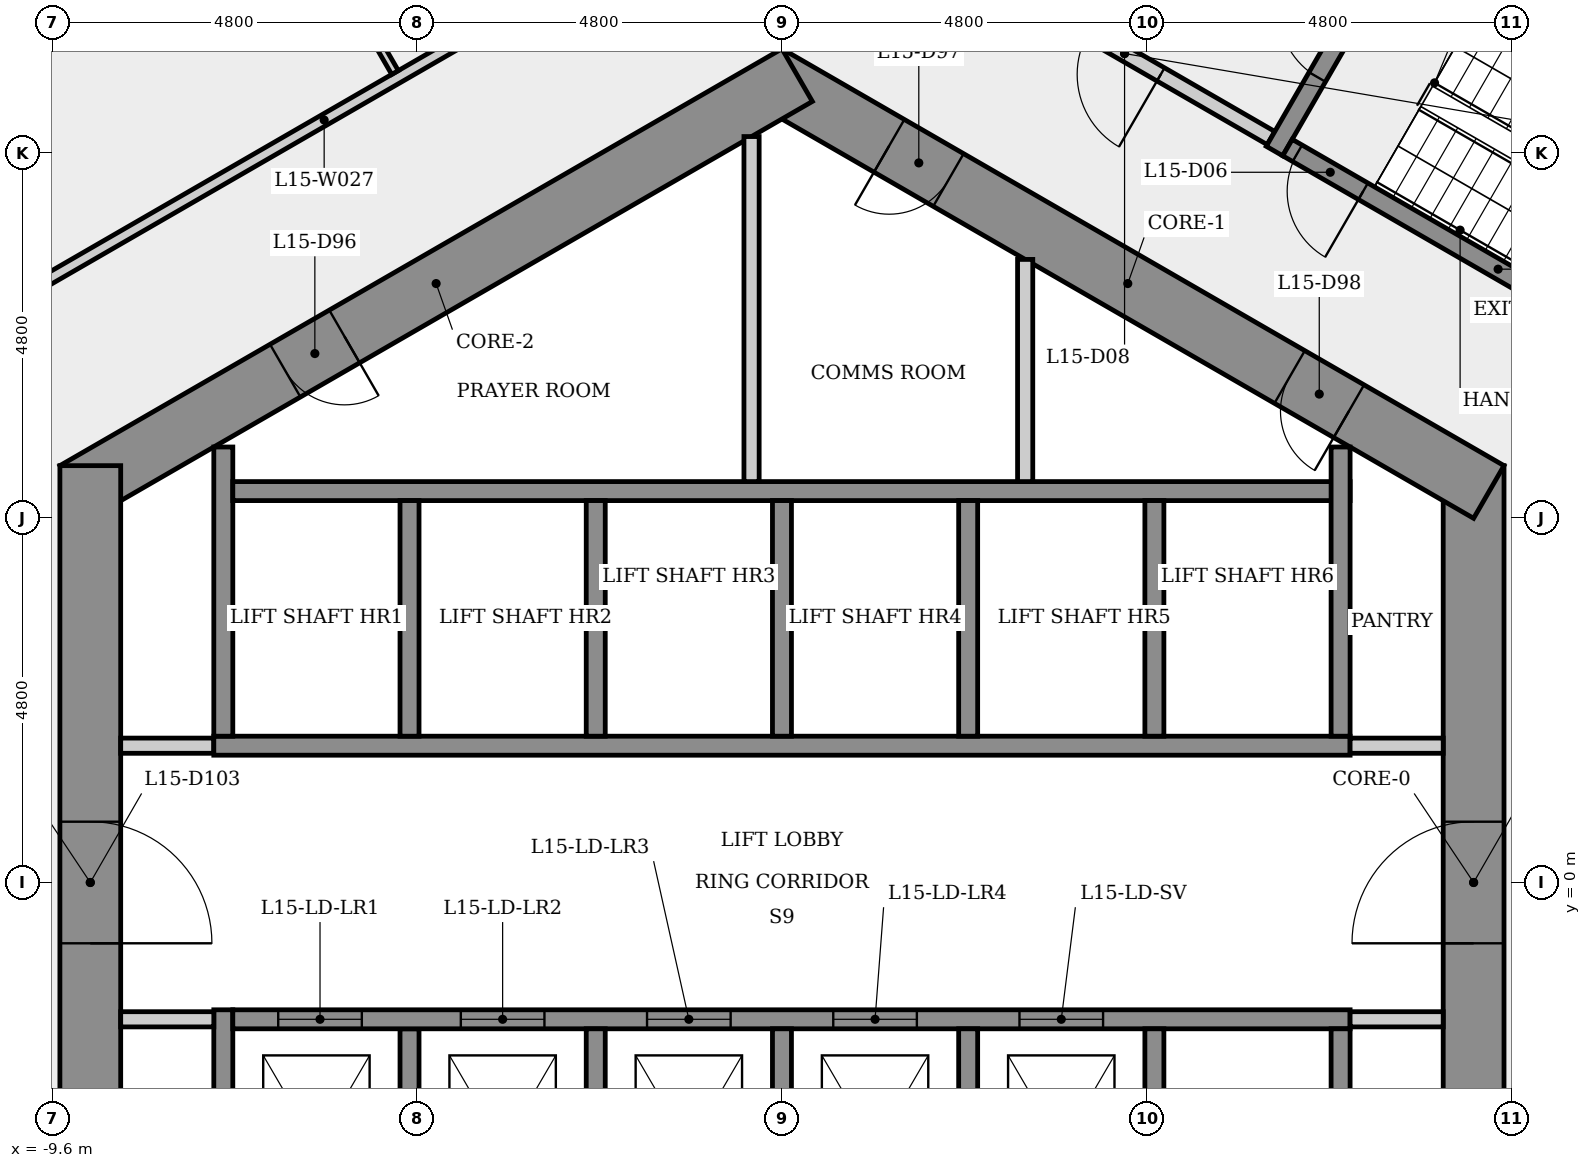
"""IFC4 building model, lengths in metres.
Left out: names, types, materials, properties, quantities, classifications, styles, units other than length and angle.
Written with IfcOpenShell. Run it as: python <this file> out.ifc"""

import sys

from ifc_helpers import new_model, si_unit, direction, frame, frame_2d, origin, place, context, subcontext, project, spatial, rectangle, extrude, element, fill, save


model = new_model("IFC4")
c1 = context("Model", 3, precision=1e-05, world=origin(), true_north=direction((0.0, 1.0)))
c2 = subcontext(c1, "Body", "Model", "MODEL_VIEW")
j1 = project(units=[si_unit("LENGTHUNIT", "METRE"), si_unit("PLANEANGLEUNIT", "RADIAN")], contexts=[c1])
p1 = place(None, origin())
s1 = spatial("IfcSite", under=j1, at=p1, CompositionType="ELEMENT")
p2 = place(p1, origin())
s2 = spatial("IfcBuilding", under=s1, at=p2, CompositionType="ELEMENT")
p3 = place(p2, frame((0.0, 0.0, 59.5)))
s3 = spatial("IfcBuildingStorey", under=s2, at=p3, CompositionType="ELEMENT", Elevation=59.5)
p4 = place(p3, frame((9.1, -5.485, 0.0), z_axis=(0.0, 0.0, 1.0), x_axis=(0.0, 1.0, 0.0)))
e1 = element("IfcWall", 1, at=p4, inside=s3, PredefinedType="SHEAR", context=c2, shape_type="SweptSolid", body=[
    extrude(rectangle(XDim=10.97, YDim=0.8, at=frame_2d((5.485, 0.0))), origin(), (0.0, 0.0, 1.0), 3.4),
])
p5 = place(p4, frame((4.685, 0.0, 0.0)))
e2 = element("IfcOpeningElement", 2, at=p5, cuts=e1, PredefinedType="OPENING", context=c2, shape_type="SweptSolid", body=[
    extrude(rectangle(XDim=1.6, YDim=2.1, at=frame_2d((0.8, 1.05))), frame((0.0, 0.41, 0.0), z_axis=(0.0, -1.0, 0.0), x_axis=(1.0, 0.0, 0.0)), (0.0, 0.0, 1.0), 0.82),
])
p6 = place(p3, frame((9.3, 5.138, 0.0), z_axis=(0.0, 0.0, 1.0), x_axis=(-0.866023993627, 0.500002442456, 0.0)))
e3 = element("IfcWall", 3, at=p6, inside=s3, PredefinedType="SHEAR", context=c2, shape_type="SweptSolid", body=[
    extrude(rectangle(XDim=10.97, YDim=0.8, at=frame_2d((5.485, 0.0))), origin(), (0.0, 0.0, 1.0), 3.4),
])
p7 = place(p6, frame((8.21, 0.0, 0.0)))
e4 = element("IfcOpeningElement", 4, at=p7, cuts=e3, PredefinedType="OPENING", context=c2, shape_type="SweptSolid", body=[
    extrude(rectangle(XDim=0.9, YDim=2.1, at=frame_2d((0.45, 1.05))), frame((0.0, 0.41, 0.0), z_axis=(0.0, -1.0, 0.0), x_axis=(1.0, 0.0, 0.0)), (0.0, 0.0, 1.0), 0.82),
])
p8 = place(p6, frame((2.126, 0.0, 0.0)))
e5 = element("IfcOpeningElement", 5, at=p8, cuts=e3, PredefinedType="OPENING", context=c2, shape_type="SweptSolid", body=[
    extrude(rectangle(XDim=0.9, YDim=2.1, at=frame_2d((0.45, 1.05))), frame((0.0, 0.41, 0.0), z_axis=(0.0, -1.0, 0.0), x_axis=(1.0, 0.0, 0.0)), (0.0, 0.0, 1.0), 0.82),
])
p9 = place(p3, frame((0.2, 10.623, 0.0), z_axis=(0.0, 0.0, 1.0), x_axis=(-0.866023993627, -0.500002442456, 0.0)))
e6 = element("IfcWall", 6, at=p9, inside=s3, PredefinedType="SHEAR", context=c2, shape_type="SweptSolid", body=[
    extrude(rectangle(XDim=10.97, YDim=0.8, at=frame_2d((5.485, 0.0))), origin(), (0.0, 0.0, 1.0), 3.4),
])
p10 = place(p9, frame((6.877, 0.0, 0.0)))
e7 = element("IfcOpeningElement", 7, at=p10, cuts=e6, PredefinedType="OPENING", context=c2, shape_type="SweptSolid", body=[
    extrude(rectangle(XDim=0.9, YDim=2.1, at=frame_2d((0.45, 1.05))), frame((0.0, 0.41, 0.0), z_axis=(0.0, -1.0, 0.0), x_axis=(1.0, 0.0, 0.0)), (0.0, 0.0, 1.0), 0.82),
])
p11 = place(p3, frame((-9.1, 5.485, 0.0), z_axis=(0.0, 0.0, 1.0), x_axis=(0.0, -1.0, 0.0)))
e8 = element("IfcWall", 8, at=p11, inside=s3, PredefinedType="SHEAR", context=c2, shape_type="SweptSolid", body=[
    extrude(rectangle(XDim=10.97, YDim=0.8, at=frame_2d((5.485, 0.0))), origin(), (0.0, 0.0, 1.0), 3.4),
])
p12 = place(p11, frame((4.685, 0.0, 0.0)))
e9 = element("IfcOpeningElement", 9, at=p12, cuts=e8, PredefinedType="OPENING", context=c2, shape_type="SweptSolid", body=[
    extrude(rectangle(XDim=1.6, YDim=2.1, at=frame_2d((0.8, 1.05))), frame((0.0, 0.41, 0.0), z_axis=(0.0, -1.0, 0.0), x_axis=(1.0, 0.0, 0.0)), (0.0, 0.0, 1.0), 0.82),
])
p13 = place(p3, frame((-10.764, 7.295, 0.0), z_axis=(0.0, 0.0, 1.0), x_axis=(0.866028150195, 0.499995243048, 0.0)))
e10 = element("IfcWall", 10, at=p13, inside=s3, PredefinedType="PARTITIONING", context=c2, shape_type="SweptSolid", body=[
    extrude(rectangle(XDim=10.949, YDim=0.15, at=frame_2d((5.475, 0.0))), origin(), (0.0, 0.0, 1.0), 3.05),
])
p14 = place(p3, frame((-8.7, 1.8, 0.0), z_axis=(0.0, 0.0, 1.0), x_axis=(1.0, 0.0, 0.0)))
e11 = element("IfcWall", 11, at=p14, inside=s3, PredefinedType="PARTITIONING", context=c2, shape_type="SweptSolid", body=[
    extrude(rectangle(XDim=1.225, YDim=0.2, at=frame_2d((0.613, 0.0))), origin(), (0.0, 0.0, 1.0), 3.05),
])
p15 = place(p3, frame((-7.475, 1.8, 0.0), z_axis=(0.0, 0.0, 1.0), x_axis=(1.0, 0.0, 0.0)))
e12 = element("IfcWall", 12, at=p15, inside=s3, PredefinedType="SHEAR", context=c2, shape_type="SweptSolid", body=[
    extrude(rectangle(XDim=14.95, YDim=0.25, at=frame_2d((7.475, 0.0))), origin(), (0.0, 0.0, 1.0), 3.05),
])
p16 = place(p3, frame((-7.35, -5.73, 0.0), z_axis=(0.0, 0.0, 1.0), x_axis=(0.0, 1.0, 0.0)))
e13 = element("IfcWall", 13, at=p16, inside=s3, PredefinedType="SHEAR", context=c2, shape_type="SweptSolid", body=[
    extrude(rectangle(XDim=4.055, YDim=0.25, at=frame_2d((2.028, 0.0))), origin(), (0.0, 0.0, 1.0), 3.05),
])
p17 = place(p3, frame((-7.35, 1.925, 0.0), z_axis=(0.0, 0.0, 1.0), x_axis=(0.0, 1.0, 0.0)))
e14 = element("IfcWall", 14, at=p17, inside=s3, PredefinedType="SHEAR", context=c2, shape_type="SweptSolid", body=[
    extrude(rectangle(XDim=3.805, YDim=0.25, at=frame_2d((1.903, 0.0))), origin(), (0.0, 0.0, 1.0), 3.05),
])
p18 = place(p3, frame((-7.225, 5.15, 0.0), z_axis=(0.0, 0.0, 1.0), x_axis=(1.0, 0.0, 0.0)))
e15 = element("IfcWall", 15, at=p18, inside=s3, PredefinedType="SHEAR", context=c2, shape_type="SweptSolid", body=[
    extrude(rectangle(XDim=14.7, YDim=0.25, at=frame_2d((7.35, 0.0))), origin(), (0.0, 0.0, 1.0), 3.05),
])
p19 = place(p3, frame((-7.475, -1.8, 0.0), z_axis=(0.0, 0.0, 1.0), x_axis=(-1.0, 0.0, 0.0)))
e16 = element("IfcWall", 16, at=p19, inside=s3, PredefinedType="PARTITIONING", context=c2, shape_type="SweptSolid", body=[
    extrude(rectangle(XDim=1.225, YDim=0.2, at=frame_2d((0.613, 0.0))), origin(), (0.0, 0.0, 1.0), 3.05),
])
p20 = place(p3, frame((-5.091, 10.657, 0.0), z_axis=(0.0, 0.0, 1.0), x_axis=(-0.499998937792, 0.866026017049, 0.0)))
e17 = element("IfcWall", 17, at=p20, inside=s3, PredefinedType="PARTITIONING", context=c2, shape_type="SweptSolid", body=[
    extrude(rectangle(XDim=9.605, YDim=0.1, at=frame_2d((4.803, 0.0))), origin(), (0.0, 0.0, 1.0), 3.05),
])
for number, where, z_axis, x_axis in (
    (18, (-4.9, -1.925, 0.0), (0.0, 0.0, 1.0), (0.0, -1.0, 0.0)),
    (19, (-4.9, 5.025, 0.0), (0.0, 0.0, 1.0), (0.0, -1.0, 0.0)),
):
    element("IfcWall", number, at=place(p3, frame(where, z_axis=z_axis, x_axis=x_axis)), inside=s3, PredefinedType="SHEAR", context=c2, shape_type="SweptSolid", body=[
        extrude(rectangle(XDim=3.1, YDim=0.25, at=frame_2d((1.55, 0.0))), origin(), (0.0, 0.0, 1.0), 3.4),
    ])
p21 = place(p3, frame((-7.225, -1.8, 0.0), z_axis=(0.0, 0.0, 1.0), x_axis=(1.0, 0.0, 0.0)))
e20 = element("IfcWall", 20, at=p21, inside=s3, PredefinedType="SHEAR", context=c2, shape_type="SweptSolid", body=[
    extrude(rectangle(XDim=14.7, YDim=0.25, at=frame_2d((7.35, 0.0))), origin(), (0.0, 0.0, 1.0), 3.05),
])
p22 = place(p21, frame((0.597, 0.0, 0.0)))
e21 = element("IfcOpeningElement", 21, at=p22, cuts=e20, PredefinedType="OPENING", context=c2, shape_type="SweptSolid", body=[
    extrude(rectangle(XDim=1.1, YDim=2.1, at=frame_2d((0.55, 1.05))), frame((0.0, 0.135, 0.0), z_axis=(0.0, -1.0, 0.0), x_axis=(1.0, 0.0, 0.0)), (0.0, 0.0, 1.0), 0.27),
])
p23 = place(p21, frame((3.0, 0.0, 0.0)))
e22 = element("IfcOpeningElement", 22, at=p23, cuts=e20, PredefinedType="OPENING", context=c2, shape_type="SweptSolid", body=[
    extrude(rectangle(XDim=1.1, YDim=2.1, at=frame_2d((0.55, 1.05))), frame((0.0, 0.135, 0.0), z_axis=(0.0, -1.0, 0.0), x_axis=(1.0, 0.0, 0.0)), (0.0, 0.0, 1.0), 0.27),
])
p24 = place(p21, frame((5.45, 0.0, 0.0)))
e23 = element("IfcOpeningElement", 23, at=p24, cuts=e20, PredefinedType="OPENING", context=c2, shape_type="SweptSolid", body=[
    extrude(rectangle(XDim=1.1, YDim=2.1, at=frame_2d((0.55, 1.05))), frame((0.0, 0.135, 0.0), z_axis=(0.0, -1.0, 0.0), x_axis=(1.0, 0.0, 0.0)), (0.0, 0.0, 1.0), 0.27),
])
p25 = place(p21, frame((7.9, 0.0, 0.0)))
e24 = element("IfcOpeningElement", 24, at=p25, cuts=e20, PredefinedType="OPENING", context=c2, shape_type="SweptSolid", body=[
    extrude(rectangle(XDim=1.1, YDim=2.1, at=frame_2d((0.55, 1.05))), frame((0.0, 0.135, 0.0), z_axis=(0.0, -1.0, 0.0), x_axis=(1.0, 0.0, 0.0)), (0.0, 0.0, 1.0), 0.27),
])
p26 = place(p21, frame((10.35, 0.0, 0.0)))
e25 = element("IfcOpeningElement", 25, at=p26, cuts=e20, PredefinedType="OPENING", context=c2, shape_type="SweptSolid", body=[
    extrude(rectangle(XDim=1.1, YDim=2.1, at=frame_2d((0.55, 1.05))), frame((0.0, 0.135, 0.0), z_axis=(0.0, -1.0, 0.0), x_axis=(1.0, 0.0, 0.0)), (0.0, 0.0, 1.0), 0.27),
])
for number, where, z_axis, x_axis in (
    (26, (-2.45, -1.925, 0.0), (0.0, 0.0, 1.0), (0.0, -1.0, 0.0)),
    (27, (-2.45, 5.025, 0.0), (0.0, 0.0, 1.0), (0.0, -1.0, 0.0)),
):
    element("IfcWall", number, at=place(p3, frame(where, z_axis=z_axis, x_axis=x_axis)), inside=s3, PredefinedType="SHEAR", context=c2, shape_type="SweptSolid", body=[
        extrude(rectangle(XDim=3.1, YDim=0.25, at=frame_2d((1.55, 0.0))), origin(), (0.0, 0.0, 1.0), 3.4),
    ])
p27 = place(p3, frame((-0.4, 9.815, 0.0), z_axis=(0.0, 0.0, 1.0), x_axis=(0.0, -1.0, 0.0)))
e28 = element("IfcWall", 28, at=p27, inside=s3, PredefinedType="PARTITIONING", context=c2, shape_type="SweptSolid", body=[
    extrude(rectangle(XDim=4.54, YDim=0.2, at=frame_2d((2.27, 0.0))), origin(), (0.0, 0.0, 1.0), 3.05),
])
for number, where, z_axis, x_axis in (
    (29, (0.0, -1.925, 0.0), (0.0, 0.0, 1.0), (0.0, -1.0, 0.0)),
    (30, (0.0, 5.025, 0.0), (0.0, 0.0, 1.0), (0.0, -1.0, 0.0)),
    (31, (2.45, -1.925, 0.0), (0.0, 0.0, 1.0), (0.0, -1.0, 0.0)),
    (32, (2.45, 5.025, 0.0), (0.0, 0.0, 1.0), (0.0, -1.0, 0.0)),
):
    element("IfcWall", number, at=place(p3, frame(where, z_axis=z_axis, x_axis=x_axis)), inside=s3, PredefinedType="SHEAR", context=c2, shape_type="SweptSolid", body=[
        extrude(rectangle(XDim=3.1, YDim=0.25, at=frame_2d((1.55, 0.0))), origin(), (0.0, 0.0, 1.0), 3.4),
    ])
p28 = place(p3, frame((3.2, 8.198, 0.0), z_axis=(0.0, 0.0, 1.0), x_axis=(0.0, -1.0, 0.0)))
e33 = element("IfcWall", 33, at=p28, inside=s3, PredefinedType="PARTITIONING", context=c2, shape_type="SweptSolid", body=[
    extrude(rectangle(XDim=2.924, YDim=0.2, at=frame_2d((1.462, 0.0))), origin(), (0.0, 0.0, 1.0), 3.05),
])
for number, where, z_axis, x_axis in (
    (34, (4.9, -1.925, 0.0), (0.0, 0.0, 1.0), (0.0, -1.0, 0.0)),
    (35, (4.9, 5.025, 0.0), (0.0, 0.0, 1.0), (0.0, -1.0, 0.0)),
):
    element("IfcWall", number, at=place(p3, frame(where, z_axis=z_axis, x_axis=x_axis)), inside=s3, PredefinedType="SHEAR", context=c2, shape_type="SweptSolid", body=[
        extrude(rectangle(XDim=3.1, YDim=0.25, at=frame_2d((1.55, 0.0))), origin(), (0.0, 0.0, 1.0), 3.4),
    ])
p29 = place(p3, frame((6.435, 9.795, 0.0), z_axis=(0.0, 0.0, 1.0), x_axis=(-0.866012907634, 0.500021643343, 0.0)))
e36 = element("IfcWall", 36, at=p29, inside=s3, PredefinedType="PARTITIONING", context=c2, shape_type="SweptSolid", body=[
    extrude(rectangle(XDim=4.45, YDim=0.2, at=frame_2d((2.225, 0.0))), origin(), (0.0, 0.0, 1.0), 3.05),
])
p30 = place(p29, frame((1.675, 0.0, 0.0)))
e37 = element("IfcOpeningElement", 37, at=p30, cuts=e36, PredefinedType="OPENING", context=c2, shape_type="SweptSolid", body=[
    extrude(rectangle(XDim=1.1, YDim=2.1, at=frame_2d((0.55, 1.05))), frame((0.0, 0.11, 0.0), z_axis=(0.0, -1.0, 0.0), x_axis=(1.0, 0.0, 0.0)), (0.0, 0.0, 1.0), 0.22),
])
p31 = place(p3, frame((6.48, 9.624, 0.0), z_axis=(0.0, 0.0, 1.0), x_axis=(0.500017246033, 0.866015446554, 0.0)))
e38 = element("IfcWall", 38, at=p31, inside=s3, PredefinedType="SHEAR", context=c2, shape_type="SweptSolid", body=[
    extrude(rectangle(XDim=3.25, YDim=0.25, at=frame_2d((1.625, 0.0))), origin(), (0.0, 0.0, 1.0), 3.05),
])
p32 = place(p31, frame((1.125, 0.0, 0.0)))
e39 = element("IfcOpeningElement", 39, at=p32, cuts=e38, PredefinedType="OPENING", context=c2, shape_type="SweptSolid", body=[
    extrude(rectangle(XDim=1.0, YDim=2.1, at=frame_2d((0.5, 1.05))), frame((0.0, 0.135, 0.0), z_axis=(0.0, -1.0, 0.0), x_axis=(1.0, 0.0, 0.0)), (0.0, 0.0, 1.0), 0.27),
])
p33 = place(p3, frame((7.475, 1.8, 0.0), z_axis=(0.0, 0.0, 1.0), x_axis=(1.0, 0.0, 0.0)))
e40 = element("IfcWall", 40, at=p33, inside=s3, PredefinedType="PARTITIONING", context=c2, shape_type="SweptSolid", body=[
    extrude(rectangle(XDim=1.225, YDim=0.2, at=frame_2d((0.613, 0.0))), origin(), (0.0, 0.0, 1.0), 3.05),
])
for number, where, z_axis, x_axis in (
    (41, (7.35, -1.925, 0.0), (0.0, 0.0, 1.0), (0.0, -1.0, 0.0)),
    (42, (7.35, 5.73, 0.0), (0.0, 0.0, 1.0), (0.0, -1.0, 0.0)),
):
    element("IfcWall", number, at=place(p3, frame(where, z_axis=z_axis, x_axis=x_axis)), inside=s3, PredefinedType="SHEAR", context=c2, shape_type="SweptSolid", body=[
        extrude(rectangle(XDim=3.805, YDim=0.25, at=frame_2d((1.903, 0.0))), origin(), (0.0, 0.0, 1.0), 3.05),
    ])
p34 = place(p3, frame((8.151, 12.268, 0.0), z_axis=(0.0, 0.0, 1.0), x_axis=(0.866025499775, -0.499999833739, 0.0)))
e43 = element("IfcWall", 43, at=p34, inside=s3, PredefinedType="SHEAR", context=c2, shape_type="SweptSolid", body=[
    extrude(rectangle(XDim=6.4, YDim=0.25, at=frame_2d((3.2, 0.0))), origin(), (0.0, 0.0, 1.0), 3.05),
])
p35 = place(p3, frame((8.7, -1.8, 0.0), z_axis=(0.0, 0.0, 1.0), x_axis=(-1.0, 0.0, 0.0)))
e44 = element("IfcWall", 44, at=p35, inside=s3, PredefinedType="PARTITIONING", context=c2, shape_type="SweptSolid", body=[
    extrude(rectangle(XDim=1.225, YDim=0.2, at=frame_2d((0.613, 0.0))), origin(), (0.0, 0.0, 1.0), 3.05),
])
p36 = place(p3, frame((12.194, 6.47, 0.0), z_axis=(0.0, 0.0, 1.0), x_axis=(-0.866025499775, 0.499999833739, 0.0)))
e45 = element("IfcWall", 45, at=p36, inside=s3, PredefinedType="SHEAR", context=c2, shape_type="SweptSolid", body=[
    extrude(rectangle(XDim=6.4, YDim=0.25, at=frame_2d((3.2, 0.0))), origin(), (0.0, 0.0, 1.0), 3.05),
])
p37 = place(p36, frame((5.25, 0.0, 0.0)))
e46 = element("IfcOpeningElement", 46, at=p37, cuts=e45, PredefinedType="OPENING", context=c2, shape_type="SweptSolid", body=[
    extrude(rectangle(XDim=1.0, YDim=2.1, at=frame_2d((0.5, 1.05))), frame((0.0, 0.135, 0.0), z_axis=(0.0, -1.0, 0.0), x_axis=(1.0, 0.0, 0.0)), (0.0, 0.0, 1.0), 0.27),
])
p38 = place(p22, origin())
e47 = element("IfcDoor", 47, at=p38, inside=s3, OperationType="SLIDING_TO_LEFT", PredefinedType="DOOR", context=c2, shape_type="SweptSolid", body=[
    extrude(rectangle(XDim=1.1, YDim=2.1, at=frame_2d((0.55, 1.05))), frame((0.0, 0.025, 0.0), z_axis=(0.0, -1.0, 0.0), x_axis=(1.0, 0.0, 0.0)), (0.0, 0.0, 1.0), 0.05),
])
fill(e21, e47)
p39 = place(p23, origin())
e48 = element("IfcDoor", 48, at=p39, inside=s3, OperationType="SLIDING_TO_LEFT", PredefinedType="DOOR", context=c2, shape_type="SweptSolid", body=[
    extrude(rectangle(XDim=1.1, YDim=2.1, at=frame_2d((0.55, 1.05))), frame((0.0, 0.025, 0.0), z_axis=(0.0, -1.0, 0.0), x_axis=(1.0, 0.0, 0.0)), (0.0, 0.0, 1.0), 0.05),
])
fill(e22, e48)
p40 = place(p24, origin())
e49 = element("IfcDoor", 49, at=p40, inside=s3, OperationType="SLIDING_TO_LEFT", PredefinedType="DOOR", context=c2, shape_type="SweptSolid", body=[
    extrude(rectangle(XDim=1.1, YDim=2.1, at=frame_2d((0.55, 1.05))), frame((0.0, 0.025, 0.0), z_axis=(0.0, -1.0, 0.0), x_axis=(1.0, 0.0, 0.0)), (0.0, 0.0, 1.0), 0.05),
])
fill(e23, e49)
p41 = place(p25, origin())
e50 = element("IfcDoor", 50, at=p41, inside=s3, OperationType="SLIDING_TO_LEFT", PredefinedType="DOOR", context=c2, shape_type="SweptSolid", body=[
    extrude(rectangle(XDim=1.1, YDim=2.1, at=frame_2d((0.55, 1.05))), frame((0.0, 0.025, 0.0), z_axis=(0.0, -1.0, 0.0), x_axis=(1.0, 0.0, 0.0)), (0.0, 0.0, 1.0), 0.05),
])
fill(e24, e50)
p42 = place(p26, origin())
e51 = element("IfcDoor", 51, at=p42, inside=s3, OperationType="SLIDING_TO_LEFT", PredefinedType="DOOR", context=c2, shape_type="SweptSolid", body=[
    extrude(rectangle(XDim=1.1, YDim=2.1, at=frame_2d((0.55, 1.05))), frame((0.0, 0.025, 0.0), z_axis=(0.0, -1.0, 0.0), x_axis=(1.0, 0.0, 0.0)), (0.0, 0.0, 1.0), 0.05),
])
fill(e25, e51)
p43 = place(p37, origin())
e52 = element("IfcDoor", 52, at=p43, inside=s3, OperationType="SINGLE_SWING_LEFT", PredefinedType="DOOR", context=c2, shape_type="SweptSolid", body=[
    extrude(rectangle(XDim=1.0, YDim=2.1, at=frame_2d((0.5, 1.05))), frame((0.0, 0.025, 0.0), z_axis=(0.0, -1.0, 0.0), x_axis=(1.0, 0.0, 0.0)), (0.0, 0.0, 1.0), 0.05),
])
fill(e46, e52)
p44 = place(p32, origin())
e53 = element("IfcDoor", 53, at=p44, inside=s3, OperationType="SINGLE_SWING_RIGHT", PredefinedType="DOOR", context=c2, shape_type="SweptSolid", body=[
    extrude(rectangle(XDim=1.0, YDim=2.1, at=frame_2d((0.5, 1.05))), frame((0.0, 0.025, 0.0), z_axis=(0.0, -1.0, 0.0), x_axis=(1.0, 0.0, 0.0)), (0.0, 0.0, 1.0), 0.05),
])
fill(e39, e53)
p45 = place(p30, origin())
e54 = element("IfcDoor", 54, at=p45, inside=s3, OperationType="SINGLE_SWING_LEFT", PredefinedType="DOOR", context=c2, shape_type="SweptSolid", body=[
    extrude(rectangle(XDim=1.1, YDim=2.1, at=frame_2d((0.55, 1.05))), frame((0.0, 0.025, 0.0), z_axis=(0.0, -1.0, 0.0), x_axis=(1.0, 0.0, 0.0)), (0.0, 0.0, 1.0), 0.05),
])
fill(e37, e54)
p46 = place(p10, origin())
e55 = element("IfcDoor", 55, at=p46, inside=s3, OperationType="SINGLE_SWING_LEFT", PredefinedType="DOOR", context=c2, shape_type="SweptSolid", body=[
    extrude(rectangle(XDim=0.9, YDim=2.1, at=frame_2d((0.45, 1.05))), frame((0.0, 0.025, 0.0), z_axis=(0.0, -1.0, 0.0), x_axis=(1.0, 0.0, 0.0)), (0.0, 0.0, 1.0), 0.05),
])
fill(e7, e55)
p47 = place(p7, origin())
e56 = element("IfcDoor", 56, at=p47, inside=s3, OperationType="SINGLE_SWING_RIGHT", PredefinedType="DOOR", context=c2, shape_type="SweptSolid", body=[
    extrude(rectangle(XDim=0.9, YDim=2.1, at=frame_2d((0.45, 1.05))), frame((0.0, 0.025, 0.0), z_axis=(0.0, -1.0, 0.0), x_axis=(1.0, 0.0, 0.0)), (0.0, 0.0, 1.0), 0.05),
])
fill(e4, e56)
p48 = place(p8, origin())
e57 = element("IfcDoor", 57, at=p48, inside=s3, OperationType="SINGLE_SWING_LEFT", PredefinedType="DOOR", context=c2, shape_type="SweptSolid", body=[
    extrude(rectangle(XDim=0.9, YDim=2.1, at=frame_2d((0.45, 1.05))), frame((0.0, 0.025, 0.0), z_axis=(0.0, -1.0, 0.0), x_axis=(1.0, 0.0, 0.0)), (0.0, 0.0, 1.0), 0.05),
])
fill(e5, e57)
p49 = place(p5, origin())
e58 = element("IfcDoor", 58, at=p49, inside=s3, OperationType="SINGLE_SWING_LEFT", PredefinedType="DOOR", context=c2, shape_type="SweptSolid", body=[
    extrude(rectangle(XDim=1.6, YDim=2.1, at=frame_2d((0.8, 1.05))), frame((0.0, 0.025, 0.0), z_axis=(0.0, -1.0, 0.0), x_axis=(1.0, 0.0, 0.0)), (0.0, 0.0, 1.0), 0.05),
])
fill(e2, e58)
p50 = place(p12, origin())
e59 = element("IfcDoor", 59, at=p50, inside=s3, OperationType="SINGLE_SWING_RIGHT", PredefinedType="DOOR", context=c2, shape_type="SweptSolid", body=[
    extrude(rectangle(XDim=1.6, YDim=2.1, at=frame_2d((0.8, 1.05))), frame((0.0, 0.025, 0.0), z_axis=(0.0, -1.0, 0.0), x_axis=(1.0, 0.0, 0.0)), (0.0, 0.0, 1.0), 0.05),
])
fill(e9, e59)
save(model, sys.argv[1])
